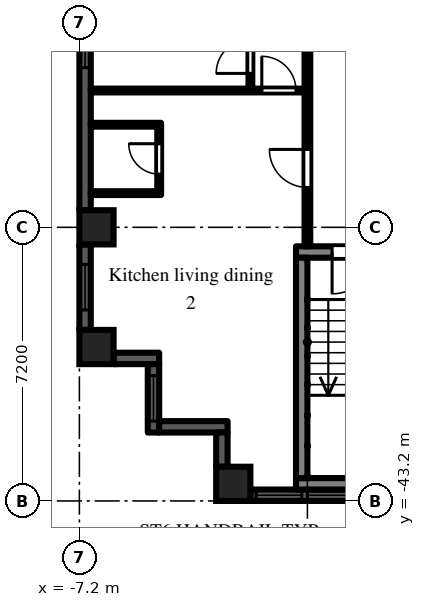
"""IFC4 building model, lengths in metres.
Left out: names, types, materials, properties, quantities, classifications, styles, units other than length and angle.
Written with IfcOpenShell. Run it as: python <this file> out.ifc"""

import sys

from ifc_helpers import new_model, si_unit, direction, frame, frame_2d, origin, origin_2d, place, context, subcontext, project, spatial, rectangle, extrude, element, fill, save


model = new_model("IFC4")
c1 = context("Model", 3, precision=1e-05, world=origin(), true_north=direction((0.0, 1.0)))
c2 = subcontext(c1, "Body", "Model", "MODEL_VIEW")
j1 = project(units=[si_unit("LENGTHUNIT", "METRE"), si_unit("PLANEANGLEUNIT", "RADIAN")], contexts=[c1])
p1 = place(None, origin())
s1 = spatial("IfcSite", under=j1, at=p1, CompositionType="ELEMENT")
p2 = place(p1, origin())
s2 = spatial("IfcBuilding", under=s1, at=p2, CompositionType="ELEMENT")
p3 = place(p2, frame((0.0, 0.0, 102.9)))
s3 = spatial("IfcBuildingStorey", under=s2, at=p3, CompositionType="ELEMENT", Elevation=102.9)
for number, where, z_axis, x_axis in (
    (1, (-6.75, -39.15, 0.0), (0.0, 0.0, 1.0), (1.0, 0.0, 0.0)),
    (2, (-6.75, -36.0, 0.0), (0.0, 0.0, 1.0), (1.0, 0.0, 0.0)),
    (3, (-3.15, -42.75, 0.0), (0.0, 0.0, 1.0), (1.0, 0.0, 0.0)),
):
    element("IfcColumn", number, at=place(p3, frame(where, z_axis=z_axis, x_axis=x_axis)), inside=s3, PredefinedType="COLUMN", context=c2, shape_type="SweptSolid", body=[
        extrude(rectangle(XDim=0.9, YDim=0.9, at=origin_2d()), origin(), (0.0, 0.0, 1.0), 3.0),
    ])
p4 = place(p3, frame((-7.05, -29.25, 0.0), z_axis=(0.0, 0.0, 1.0), x_axis=(0.0, -1.0, 0.0)))
e4 = element("IfcWall", 4, at=p4, inside=s3, PredefinedType="SOLIDWALL", context=c2, shape_type="SweptSolid", body=[
    extrude(rectangle(XDim=6.3, YDim=0.3, at=frame_2d((3.15, 0.0))), origin(), (0.0, 0.0, 1.0), 2.1),
])
p5 = place(p4, frame((0.15, 0.0, 0.2)))
e5 = element("IfcOpeningElement", 5, at=p5, cuts=e4, PredefinedType="OPENING", context=c2, shape_type="SweptSolid", body=[
    extrude(rectangle(XDim=2.4, YDim=1.85, at=frame_2d((1.2, 0.925))), frame((0.0, 0.16, 0.0), z_axis=(0.0, -1.0, 0.0), x_axis=(1.0, 0.0, 0.0)), (0.0, 0.0, 1.0), 0.32),
])
p6 = place(p3, frame((-7.05, -36.45, 0.0), z_axis=(0.0, 0.0, 1.0), x_axis=(0.0, -1.0, 0.0)))
e6 = element("IfcWall", 6, at=p6, inside=s3, PredefinedType="SOLIDWALL", context=c2, shape_type="SweptSolid", body=[
    extrude(rectangle(XDim=2.25, YDim=0.3, at=frame_2d((1.125, 0.0))), origin(), (0.0, 0.0, 1.0), 2.1),
])
p7 = place(p6, frame((0.525, 0.0, 0.2)))
e7 = element("IfcOpeningElement", 7, at=p7, cuts=e6, PredefinedType="OPENING", context=c2, shape_type="SweptSolid", body=[
    extrude(rectangle(XDim=1.2, YDim=1.85, at=frame_2d((0.6, 0.925))), frame((0.0, 0.16, 0.0), z_axis=(0.0, -1.0, 0.0), x_axis=(1.0, 0.0, 0.0)), (0.0, 0.0, 1.0), 0.32),
])
p8 = place(p3, frame((-6.3, -39.45, 0.0), z_axis=(0.0, 0.0, 1.0), x_axis=(1.0, 0.0, 0.0)))
e8 = element("IfcWall", 8, at=p8, inside=s3, PredefinedType="SOLIDWALL", context=c2, shape_type="SweptSolid", body=[
    extrude(rectangle(XDim=1.2, YDim=0.3, at=frame_2d((0.6, 0.0))), origin(), (0.0, 0.0, 1.0), 2.575),
])
p9 = place(p3, frame((-5.25, -39.6, 0.0), z_axis=(0.0, 0.0, 1.0), x_axis=(0.0, -1.0, 0.0)))
e9 = element("IfcWall", 9, at=p9, inside=s3, PredefinedType="SOLIDWALL", context=c2, shape_type="SweptSolid", body=[
    extrude(rectangle(XDim=1.8, YDim=0.3, at=frame_2d((0.9, 0.0))), origin(), (0.0, 0.0, 1.0), 2.575),
])
p10 = place(p9, frame((0.3, 0.0, 0.2)))
e10 = element("IfcOpeningElement", 10, at=p10, cuts=e9, PredefinedType="OPENING", context=c2, shape_type="SweptSolid", body=[
    extrude(rectangle(XDim=1.2, YDim=1.85, at=frame_2d((0.6, 0.925))), frame((0.0, 0.16, 0.0), z_axis=(0.0, -1.0, 0.0), x_axis=(1.0, 0.0, 0.0)), (0.0, 0.0, 1.0), 0.32),
])
p11 = place(p3, frame((-5.1, -41.25, 0.0), z_axis=(0.0, 0.0, 1.0), x_axis=(1.0, 0.0, 0.0)))
e11 = element("IfcWall", 11, at=p11, inside=s3, PredefinedType="SOLIDWALL", context=c2, shape_type="SweptSolid", body=[
    extrude(rectangle(XDim=1.8, YDim=0.3, at=frame_2d((0.9, 0.0))), origin(), (0.0, 0.0, 1.0), 2.575),
])
p12 = place(p3, frame((-3.45, -41.4, 0.0), z_axis=(0.0, 0.0, 1.0), x_axis=(0.0, -1.0, 0.0)))
e12 = element("IfcWall", 12, at=p12, inside=s3, PredefinedType="SOLIDWALL", context=c2, shape_type="SweptSolid", body=[
    extrude(rectangle(XDim=0.9, YDim=0.3, at=frame_2d((0.45, 0.0))), origin(), (0.0, 0.0, 1.0), 2.575),
])
p13 = place(p3, frame((-2.7, -43.05, 0.0), z_axis=(0.0, 0.0, 1.0), x_axis=(1.0, 0.0, 0.0)))
e13 = element("IfcWall", 13, at=p13, inside=s3, PredefinedType="SOLIDWALL", context=c2, shape_type="SweptSolid", body=[
    extrude(rectangle(XDim=5.4, YDim=0.3, at=frame_2d((2.7, 0.0))), origin(), (0.0, 0.0, 1.0), 2.1),
])
p14 = place(p13, frame((1.5, 0.0, 0.2)))
e14 = element("IfcOpeningElement", 14, at=p14, cuts=e13, PredefinedType="OPENING", context=c2, shape_type="SweptSolid", body=[
    extrude(rectangle(XDim=2.4, YDim=1.85, at=frame_2d((1.2, 0.925))), frame((0.0, 0.16, 0.0), z_axis=(0.0, -1.0, 0.0), x_axis=(1.0, 0.0, 0.0)), (0.0, 0.0, 1.0), 0.32),
])
p15 = place(p13, frame((0.15, 0.0, 0.2)))
e15 = element("IfcOpeningElement", 15, at=p15, cuts=e13, PredefinedType="OPENING", context=c2, shape_type="SweptSolid", body=[
    extrude(rectangle(XDim=1.2, YDim=1.85, at=frame_2d((0.6, 0.925))), frame((0.0, 0.16, 0.0), z_axis=(0.0, -1.0, 0.0), x_axis=(1.0, 0.0, 0.0)), (0.0, 0.0, 1.0), 0.32),
])
p16 = place(p13, frame((4.05, 0.0, 0.2)))
e16 = element("IfcOpeningElement", 16, at=p16, cuts=e13, PredefinedType="OPENING", context=c2, shape_type="SweptSolid", body=[
    extrude(rectangle(XDim=1.2, YDim=1.85, at=frame_2d((0.6, 0.925))), frame((0.0, 0.16, 0.0), z_axis=(0.0, -1.0, 0.0), x_axis=(1.0, 0.0, 0.0)), (0.0, 0.0, 1.0), 0.32),
])
p17 = place(p3, frame((-1.5, -36.65, 0.0), z_axis=(0.0, 0.0, 1.0), x_axis=(1.0, 0.0, 0.0)))
e17 = element("IfcWall", 17, at=p17, inside=s3, PredefinedType="SHEAR", context=c2, shape_type="SweptSolid", body=[
    extrude(rectangle(XDim=3.0, YDim=0.3, at=frame_2d((1.5, 0.0))), origin(), (0.0, 0.0, 1.0), 2.575),
])
p18 = place(p17, frame((0.95, 0.0, 0.0)))
e18 = element("IfcOpeningElement", 18, at=p18, cuts=e17, PredefinedType="OPENING", context=c2, shape_type="SweptSolid", body=[
    extrude(rectangle(XDim=1.1, YDim=2.1, at=frame_2d((0.55, 1.05))), frame((0.0, 0.16, 0.0), z_axis=(0.0, -1.0, 0.0), x_axis=(1.0, 0.0, 0.0)), (0.0, 0.0, 1.0), 0.32),
])
p19 = place(p3, frame((-1.5, -42.75, 0.0), z_axis=(0.0, 0.0, 1.0), x_axis=(1.0, 0.0, 0.0)))
e19 = element("IfcWall", 19, at=p19, inside=s3, PredefinedType="SHEAR", context=c2, shape_type="SweptSolid", body=[
    extrude(rectangle(XDim=3.0, YDim=0.3, at=frame_2d((1.5, 0.0))), origin(), (0.0, 0.0, 1.0), 2.575),
])
p20 = place(p3, frame((-1.35, -36.8, 0.0), z_axis=(0.0, 0.0, 1.0), x_axis=(0.0, -1.0, 0.0)))
e20 = element("IfcWall", 20, at=p20, inside=s3, PredefinedType="SHEAR", context=c2, shape_type="SweptSolid", body=[
    extrude(rectangle(XDim=5.8, YDim=0.3, at=frame_2d((2.9, 0.0))), origin(), (0.0, 0.0, 1.0), 2.575),
])
for number, where, z_axis, x_axis in (
    (21, (-6.9, -35.1, 0.0), (0.0, 0.0, 1.0), (1.0, 0.0, 0.0)),
    (22, (-6.9, -33.3, 0.0), (0.0, 0.0, 1.0), (1.0, 0.0, 0.0)),
):
    element("IfcWall", number, at=place(p3, frame(where, z_axis=z_axis, x_axis=x_axis)), inside=s3, PredefinedType="PARTITIONING", context=c2, shape_type="SweptSolid", body=[
        extrude(rectangle(XDim=1.85, YDim=0.1, at=frame_2d((0.925, 0.0))), origin(), (0.0, 0.0, 1.0), 2.575),
    ])
p21 = place(p3, frame((-6.9, -32.4, 0.0), z_axis=(0.0, 0.0, 1.0), x_axis=(1.0, 0.0, 0.0)))
e23 = element("IfcWall", 23, at=p21, inside=s3, PredefinedType="PARTITIONING", context=c2, shape_type="SweptSolid", body=[
    extrude(rectangle(XDim=5.625, YDim=0.1, at=frame_2d((2.812, 0.0))), origin(), (0.0, 0.0, 1.0), 2.575),
])
p22 = place(p21, frame((4.5, 0.0, 0.0)))
e24 = element("IfcOpeningElement", 24, at=p22, cuts=e23, PredefinedType="OPENING", context=c2, shape_type="SweptSolid", body=[
    extrude(rectangle(XDim=0.9, YDim=2.1, at=frame_2d((0.45, 1.05))), frame((0.0, 0.06, 0.0), z_axis=(0.0, -1.0, 0.0), x_axis=(1.0, 0.0, 0.0)), (0.0, 0.0, 1.0), 0.12),
])
p23 = place(p3, frame((-5.1, -35.05, 0.0), z_axis=(0.0, 0.0, 1.0), x_axis=(0.0, 1.0, 0.0)))
e25 = element("IfcWall", 25, at=p23, inside=s3, PredefinedType="PARTITIONING", context=c2, shape_type="SweptSolid", body=[
    extrude(rectangle(XDim=1.7, YDim=0.1, at=frame_2d((0.85, 0.0))), origin(), (0.0, 0.0, 1.0), 2.575),
])
p24 = place(p23, frame((0.45, 0.0, 0.0)))
e26 = element("IfcOpeningElement", 26, at=p24, cuts=e25, PredefinedType="OPENING", context=c2, shape_type="SweptSolid", body=[
    extrude(rectangle(XDim=0.8, YDim=2.1, at=frame_2d((0.4, 1.05))), frame((0.0, 0.06, 0.0), z_axis=(0.0, -1.0, 0.0), x_axis=(1.0, 0.0, 0.0)), (0.0, 0.0, 1.0), 0.12),
])
p25 = place(p3, frame((-2.7, -32.35, 0.0), z_axis=(0.0, 0.0, 1.0), x_axis=(0.0, 1.0, 0.0)))
e27 = element("IfcWall", 27, at=p25, inside=s3, PredefinedType="PARTITIONING", context=c2, shape_type="SweptSolid", body=[
    extrude(rectangle(XDim=14.275, YDim=0.1, at=frame_2d((7.138, 0.0))), origin(), (0.0, 0.0, 1.0), 2.575),
])
p26 = place(p25, frame((0.4, 0.0, 0.0)))
e28 = element("IfcOpeningElement", 28, at=p26, cuts=e27, PredefinedType="OPENING", context=c2, shape_type="SweptSolid", body=[
    extrude(rectangle(XDim=0.9, YDim=2.1, at=frame_2d((0.45, 1.05))), frame((0.0, 0.06, 0.0), z_axis=(0.0, -1.0, 0.0), x_axis=(1.0, 0.0, 0.0)), (0.0, 0.0, 1.0), 0.12),
])
p27 = place(p25, frame((5.8, 0.0, 0.0)))
e29 = element("IfcOpeningElement", 29, at=p27, cuts=e27, PredefinedType="OPENING", context=c2, shape_type="SweptSolid", body=[
    extrude(rectangle(XDim=0.9, YDim=2.1, at=frame_2d((0.45, 1.05))), frame((0.0, 0.06, 0.0), z_axis=(0.0, -1.0, 0.0), x_axis=(1.0, 0.0, 0.0)), (0.0, 0.0, 1.0), 0.12),
])
p28 = place(p25, frame((7.6, 0.0, 0.0)))
e30 = element("IfcOpeningElement", 30, at=p28, cuts=e27, PredefinedType="OPENING", context=c2, shape_type="SweptSolid", body=[
    extrude(rectangle(XDim=0.9, YDim=2.1, at=frame_2d((0.45, 1.05))), frame((0.0, 0.06, 0.0), z_axis=(0.0, -1.0, 0.0), x_axis=(1.0, 0.0, 0.0)), (0.0, 0.0, 1.0), 0.12),
])
p29 = place(p25, frame((13.0, 0.0, 0.0)))
e31 = element("IfcOpeningElement", 31, at=p29, cuts=e27, PredefinedType="OPENING", context=c2, shape_type="SweptSolid", body=[
    extrude(rectangle(XDim=0.9, YDim=2.1, at=frame_2d((0.45, 1.05))), frame((0.0, 0.06, 0.0), z_axis=(0.0, -1.0, 0.0), x_axis=(1.0, 0.0, 0.0)), (0.0, 0.0, 1.0), 0.12),
])
p30 = place(p3, frame((-1.2, -36.5, 0.0), z_axis=(0.0, 0.0, 1.0), x_axis=(0.0, 1.0, 0.0)))
e32 = element("IfcWall", 32, at=p30, inside=s3, PredefinedType="PARTITIONING", context=c2, shape_type="SweptSolid", body=[
    extrude(rectangle(XDim=35.225, YDim=0.15, at=frame_2d((17.613, 0.0))), origin(), (0.0, 0.0, 1.0), 2.575),
])
p31 = place(p30, frame((31.85, 0.0, 0.0)))
e33 = element("IfcOpeningElement", 33, at=p31, cuts=e32, PredefinedType="OPENING", context=c2, shape_type="SweptSolid", body=[
    extrude(rectangle(XDim=0.9, YDim=2.1, at=frame_2d((0.45, 1.05))), frame((0.0, 0.085, 0.0), z_axis=(0.0, -1.0, 0.0), x_axis=(1.0, 0.0, 0.0)), (0.0, 0.0, 1.0), 0.17),
])
p32 = place(p30, frame((27.05, 0.0, 0.0)))
e34 = element("IfcOpeningElement", 34, at=p32, cuts=e32, PredefinedType="OPENING", context=c2, shape_type="SweptSolid", body=[
    extrude(rectangle(XDim=0.9, YDim=2.1, at=frame_2d((0.45, 1.05))), frame((0.0, 0.085, 0.0), z_axis=(0.0, -1.0, 0.0), x_axis=(1.0, 0.0, 0.0)), (0.0, 0.0, 1.0), 0.17),
])
p33 = place(p30, frame((20.75, 0.0, 0.0)))
e35 = element("IfcOpeningElement", 35, at=p33, cuts=e32, PredefinedType="OPENING", context=c2, shape_type="SweptSolid", body=[
    extrude(rectangle(XDim=0.9, YDim=2.1, at=frame_2d((0.45, 1.05))), frame((0.0, 0.085, 0.0), z_axis=(0.0, -1.0, 0.0), x_axis=(1.0, 0.0, 0.0)), (0.0, 0.0, 1.0), 0.17),
])
p34 = place(p30, frame((18.95, 0.0, 0.0)))
e36 = element("IfcOpeningElement", 36, at=p34, cuts=e32, PredefinedType="OPENING", context=c2, shape_type="SweptSolid", body=[
    extrude(rectangle(XDim=0.9, YDim=2.1, at=frame_2d((0.45, 1.05))), frame((0.0, 0.085, 0.0), z_axis=(0.0, -1.0, 0.0), x_axis=(1.0, 0.0, 0.0)), (0.0, 0.0, 1.0), 0.17),
])
p35 = place(p30, frame((1.55, 0.0, 0.0)))
e37 = element("IfcOpeningElement", 37, at=p35, cuts=e32, PredefinedType="OPENING", context=c2, shape_type="SweptSolid", body=[
    extrude(rectangle(XDim=1.0, YDim=2.1, at=frame_2d((0.5, 1.05))), frame((0.0, 0.085, 0.0), z_axis=(0.0, -1.0, 0.0), x_axis=(1.0, 0.0, 0.0)), (0.0, 0.0, 1.0), 0.17),
])
p36 = place(p5, origin())
e38 = element("IfcWindow", 38, at=p36, inside=s3, PartitioningType="SINGLE_PANEL", PredefinedType="WINDOW", context=c2, shape_type="SweptSolid", body=[
    extrude(rectangle(XDim=2.4, YDim=1.85, at=frame_2d((1.2, 0.925))), frame((0.0, 0.03, 0.0), z_axis=(0.0, -1.0, 0.0), x_axis=(1.0, 0.0, 0.0)), (0.0, 0.0, 1.0), 0.06),
])
fill(e5, e38)
p37 = place(p7, origin())
e39 = element("IfcWindow", 39, at=p37, inside=s3, PartitioningType="SINGLE_PANEL", PredefinedType="WINDOW", context=c2, shape_type="SweptSolid", body=[
    extrude(rectangle(XDim=1.2, YDim=1.85, at=frame_2d((0.6, 0.925))), frame((0.0, 0.03, 0.0), z_axis=(0.0, -1.0, 0.0), x_axis=(1.0, 0.0, 0.0)), (0.0, 0.0, 1.0), 0.06),
])
fill(e7, e39)
p38 = place(p10, origin())
e40 = element("IfcWindow", 40, at=p38, inside=s3, PartitioningType="SINGLE_PANEL", PredefinedType="WINDOW", context=c2, shape_type="SweptSolid", body=[
    extrude(rectangle(XDim=1.2, YDim=1.85, at=frame_2d((0.6, 0.925))), frame((0.0, 0.03, 0.0), z_axis=(0.0, -1.0, 0.0), x_axis=(1.0, 0.0, 0.0)), (0.0, 0.0, 1.0), 0.06),
])
fill(e10, e40)
p39 = place(p14, origin())
e41 = element("IfcWindow", 41, at=p39, inside=s3, PartitioningType="SINGLE_PANEL", PredefinedType="WINDOW", context=c2, shape_type="SweptSolid", body=[
    extrude(rectangle(XDim=2.4, YDim=1.85, at=frame_2d((1.2, 0.925))), frame((0.0, 0.03, 0.0), z_axis=(0.0, -1.0, 0.0), x_axis=(1.0, 0.0, 0.0)), (0.0, 0.0, 1.0), 0.06),
])
fill(e14, e41)
p40 = place(p15, origin())
e42 = element("IfcWindow", 42, at=p40, inside=s3, PartitioningType="SINGLE_PANEL", PredefinedType="WINDOW", context=c2, shape_type="SweptSolid", body=[
    extrude(rectangle(XDim=1.2, YDim=1.85, at=frame_2d((0.6, 0.925))), frame((0.0, 0.03, 0.0), z_axis=(0.0, -1.0, 0.0), x_axis=(1.0, 0.0, 0.0)), (0.0, 0.0, 1.0), 0.06),
])
fill(e15, e42)
p41 = place(p18, frame((1.1, 0.0, 0.0), z_axis=(0.0, 0.0, 1.0), x_axis=(-1.0, 0.0, 0.0)))
e43 = element("IfcDoor", 43, at=p41, inside=s3, OperationType="SINGLE_SWING_RIGHT", PredefinedType="DOOR", context=c2, shape_type="SweptSolid", body=[
    extrude(rectangle(XDim=1.1, YDim=2.1, at=frame_2d((0.55, 1.05))), frame((0.0, 0.025, 0.0), z_axis=(0.0, -1.0, 0.0), x_axis=(1.0, 0.0, 0.0)), (0.0, 0.0, 1.0), 0.05),
])
fill(e18, e43)
p42 = place(p24, origin())
e44 = element("IfcDoor", 44, at=p42, inside=s3, OperationType="SINGLE_SWING_RIGHT", PredefinedType="DOOR", context=c2, shape_type="SweptSolid", body=[
    extrude(rectangle(XDim=0.8, YDim=2.1, at=frame_2d((0.4, 1.05))), frame((0.0, 0.025, 0.0), z_axis=(0.0, -1.0, 0.0), x_axis=(1.0, 0.0, 0.0)), (0.0, 0.0, 1.0), 0.05),
])
fill(e26, e44)
p43 = place(p35, origin())
e45 = element("IfcDoor", 45, at=p43, inside=s3, OperationType="SINGLE_SWING_RIGHT", PredefinedType="DOOR", context=c2, shape_type="SweptSolid", body=[
    extrude(rectangle(XDim=1.0, YDim=2.1, at=frame_2d((0.5, 1.05))), frame((0.0, 0.025, 0.0), z_axis=(0.0, -1.0, 0.0), x_axis=(1.0, 0.0, 0.0)), (0.0, 0.0, 1.0), 0.05),
])
fill(e37, e45)
p44 = place(p26, origin())
e46 = element("IfcDoor", 46, at=p44, inside=s3, OperationType="SINGLE_SWING_LEFT", PredefinedType="DOOR", context=c2, shape_type="SweptSolid", body=[
    extrude(rectangle(XDim=0.9, YDim=2.1, at=frame_2d((0.45, 1.05))), frame((0.0, 0.025, 0.0), z_axis=(0.0, -1.0, 0.0), x_axis=(1.0, 0.0, 0.0)), (0.0, 0.0, 1.0), 0.05),
])
fill(e28, e46)
p45 = place(p22, origin())
e47 = element("IfcDoor", 47, at=p45, inside=s3, OperationType="SINGLE_SWING_LEFT", PredefinedType="DOOR", context=c2, shape_type="SweptSolid", body=[
    extrude(rectangle(XDim=0.9, YDim=2.1, at=frame_2d((0.45, 1.05))), frame((0.0, 0.025, 0.0), z_axis=(0.0, -1.0, 0.0), x_axis=(1.0, 0.0, 0.0)), (0.0, 0.0, 1.0), 0.05),
])
fill(e24, e47)
save(model, sys.argv[1])
